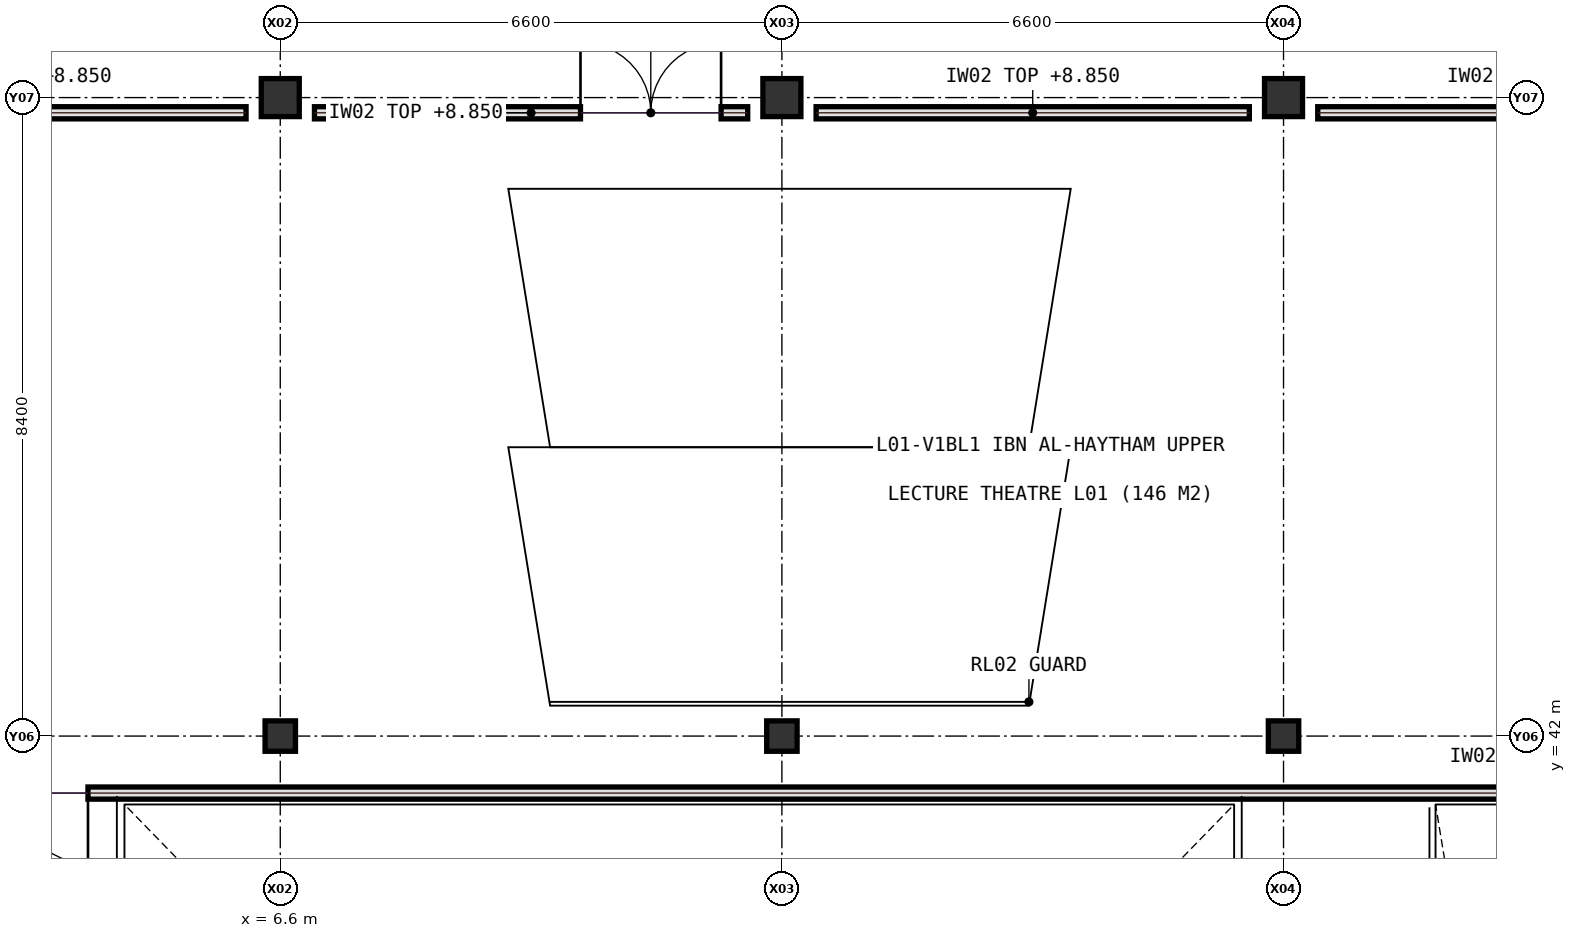
"""IFC4 building model, lengths in metres.
Left out: names, types, materials, properties, quantities, classifications, styles, units other than length and angle.
Written with IfcOpenShell. Run it as: python <this file> out.ifc"""

import sys

from ifc_helpers import new_model, si_unit, direction, frame, frame_2d, origin, origin_2d, place, context, subcontext, project, spatial, rectangle, extrude, element, fill, save


model = new_model("IFC4")
c1 = context("Model", 3, precision=1e-05, world=origin(), true_north=direction((0.0, 1.0)))
c2 = subcontext(c1, "Body", "Model", "MODEL_VIEW")
j1 = project(units=[si_unit("LENGTHUNIT", "METRE"), si_unit("PLANEANGLEUNIT", "RADIAN")], contexts=[c1])
p1 = place(None, origin())
s1 = spatial("IfcSite", under=j1, at=p1, CompositionType="ELEMENT")
p2 = place(p1, origin())
s2 = spatial("IfcBuilding", under=s1, at=p2, CompositionType="ELEMENT")
p3 = place(p2, frame((0.0, 0.0, 5.4)))
s3 = spatial("IfcBuildingStorey", under=s2, at=p3, CompositionType="ELEMENT", Elevation=5.4)
p4 = place(p3, frame((6.6, 42.0, 0.0), z_axis=(0.0, 0.0, 1.0), x_axis=(1.0, 0.0, 0.0)))
e1 = element("IfcColumn", 1, at=p4, inside=s3, PredefinedType="COLUMN", context=c2, shape_type="SweptSolid", body=[
    extrude(rectangle(XDim=0.4, YDim=0.4, at=origin_2d()), origin(), (0.0, 0.0, 1.0), 4.5),
])
p5 = place(p3, frame((6.6, 50.4, 0.0), z_axis=(0.0, 0.0, 1.0), x_axis=(1.0, 0.0, 0.0)))
e2 = element("IfcColumn", 2, at=p5, inside=s3, PredefinedType="COLUMN", context=c2, shape_type="SweptSolid", body=[
    extrude(rectangle(XDim=0.5, YDim=0.5, at=origin_2d()), origin(), (0.0, 0.0, 1.0), 4.5),
])
p6 = place(p3, frame((13.2, 42.0, 0.0), z_axis=(0.0, 0.0, 1.0), x_axis=(1.0, 0.0, 0.0)))
e3 = element("IfcColumn", 3, at=p6, inside=s3, PredefinedType="COLUMN", context=c2, shape_type="SweptSolid", body=[
    extrude(rectangle(XDim=0.4, YDim=0.4, at=origin_2d()), origin(), (0.0, 0.0, 1.0), 4.5),
])
p7 = place(p3, frame((13.2, 50.4, 0.0), z_axis=(0.0, 0.0, 1.0), x_axis=(1.0, 0.0, 0.0)))
e4 = element("IfcColumn", 4, at=p7, inside=s3, PredefinedType="COLUMN", context=c2, shape_type="SweptSolid", body=[
    extrude(rectangle(XDim=0.5, YDim=0.5, at=origin_2d()), origin(), (0.0, 0.0, 1.0), 4.5),
])
p8 = place(p3, frame((19.8, 42.0, 0.0), z_axis=(0.0, 0.0, 1.0), x_axis=(1.0, 0.0, 0.0)))
e5 = element("IfcColumn", 5, at=p8, inside=s3, PredefinedType="COLUMN", context=c2, shape_type="SweptSolid", body=[
    extrude(rectangle(XDim=0.4, YDim=0.4, at=origin_2d()), origin(), (0.0, 0.0, 1.0), 4.5),
])
p9 = place(p3, frame((19.8, 50.4, 0.0), z_axis=(0.0, 0.0, 1.0), x_axis=(1.0, 0.0, 0.0)))
e6 = element("IfcColumn", 6, at=p9, inside=s3, PredefinedType="COLUMN", context=c2, shape_type="SweptSolid", body=[
    extrude(rectangle(XDim=0.5, YDim=0.5, at=origin_2d()), origin(), (0.0, 0.0, 1.0), 4.5),
])
p10 = place(p3, frame((0.32, 41.25, 0.0), z_axis=(0.0, 0.0, 1.0), x_axis=(1.0, 0.0, 0.0)))
e7 = element("IfcWall", 7, at=p10, inside=s3, PredefinedType="PARTITIONING", context=c2, shape_type="SweptSolid", body=[
    extrude(rectangle(XDim=45.63, YDim=0.16, at=frame_2d((22.815, 0.0))), origin(), (0.0, 0.0, 1.0), 3.45),
])
p11 = place(p10, frame((1.9, 0.0, 0.0)))
e8 = element("IfcOpeningElement", 8, at=p11, cuts=e7, PredefinedType="OPENING", context=c2, shape_type="SweptSolid", body=[
    extrude(rectangle(XDim=1.85, YDim=2.25, at=frame_2d((0.925, 1.125))), frame((0.0, 0.09, 0.0), z_axis=(0.0, -1.0, 0.0), x_axis=(1.0, 0.0, 0.0)), (0.0, 0.0, 1.0), 0.18),
])
p12 = place(p10, frame((24.6, 0.0, 0.0)))
e9 = element("IfcOpeningElement", 9, at=p12, cuts=e7, PredefinedType="OPENING", context=c2, shape_type="SweptSolid", body=[
    extrude(rectangle(XDim=1.85, YDim=2.25, at=frame_2d((0.925, 1.125))), frame((0.0, 0.09, 0.0), z_axis=(0.0, -1.0, 0.0), x_axis=(1.0, 0.0, 0.0)), (0.0, 0.0, 1.0), 0.18),
])
p13 = place(p10, frame((43.2, 0.0, 0.0)))
e10 = element("IfcOpeningElement", 10, at=p13, cuts=e7, PredefinedType="OPENING", context=c2, shape_type="SweptSolid", body=[
    extrude(rectangle(XDim=1.85, YDim=2.25, at=frame_2d((0.925, 1.125))), frame((0.0, 0.09, 0.0), z_axis=(0.0, -1.0, 0.0), x_axis=(1.0, 0.0, 0.0)), (0.0, 0.0, 1.0), 0.18),
])
p14 = place(p3, frame((0.32, 50.2, 0.0), z_axis=(0.0, 0.0, 1.0), x_axis=(1.0, 0.0, 0.0)))
e11 = element("IfcWall", 11, at=p14, inside=s3, PredefinedType="PARTITIONING", context=c2, shape_type="SweptSolid", body=[
    extrude(rectangle(XDim=5.83, YDim=0.16, at=frame_2d((2.915, 0.0))), origin(), (0.0, 0.0, 1.0), 3.45),
])
p15 = place(p3, frame((7.05, 50.2, 0.0), z_axis=(0.0, 0.0, 1.0), x_axis=(1.0, 0.0, 0.0)))
e12 = element("IfcWall", 12, at=p15, inside=s3, PredefinedType="PARTITIONING", context=c2, shape_type="SweptSolid", body=[
    extrude(rectangle(XDim=5.7, YDim=0.16, at=frame_2d((2.85, 0.0))), origin(), (0.0, 0.0, 1.0), 3.45),
])
p16 = place(p15, frame((3.5, 0.0, 0.0)))
e13 = element("IfcOpeningElement", 13, at=p16, cuts=e12, PredefinedType="OPENING", context=c2, shape_type="SweptSolid", body=[
    extrude(rectangle(XDim=1.85, YDim=2.25, at=frame_2d((0.925, 1.125))), frame((0.0, 0.09, 0.0), z_axis=(0.0, -1.0, 0.0), x_axis=(1.0, 0.0, 0.0)), (0.0, 0.0, 1.0), 0.18),
])
p17 = place(p3, frame((13.65, 50.2, 0.0), z_axis=(0.0, 0.0, 1.0), x_axis=(1.0, 0.0, 0.0)))
e14 = element("IfcWall", 14, at=p17, inside=s3, PredefinedType="PARTITIONING", context=c2, shape_type="SweptSolid", body=[
    extrude(rectangle(XDim=5.7, YDim=0.16, at=frame_2d((2.85, 0.0))), origin(), (0.0, 0.0, 1.0), 3.45),
])
p18 = place(p3, frame((20.25, 50.2, 0.0), z_axis=(0.0, 0.0, 1.0), x_axis=(1.0, 0.0, 0.0)))
e15 = element("IfcWall", 15, at=p18, inside=s3, PredefinedType="PARTITIONING", context=c2, shape_type="SweptSolid", body=[
    extrude(rectangle(XDim=5.7, YDim=0.16, at=frame_2d((2.85, 0.0))), origin(), (0.0, 0.0, 1.0), 3.45),
])
p19 = place(p11, frame((1.85, 0.0, 0.0), z_axis=(0.0, 0.0, 1.0), x_axis=(-1.0, 0.0, 0.0)))
e16 = element("IfcDoor", 16, at=p19, inside=s3, OperationType="DOUBLE_DOOR_SINGLE_SWING", PredefinedType="DOOR", context=c2, shape_type="SweptSolid", body=[
    extrude(rectangle(XDim=1.85, YDim=2.25, at=frame_2d((0.925, 1.125))), frame((0.0, 0.025, 0.0), z_axis=(0.0, -1.0, 0.0), x_axis=(1.0, 0.0, 0.0)), (0.0, 0.0, 1.0), 0.05),
])
fill(e8, e16)
p20 = place(p16, origin())
e17 = element("IfcDoor", 17, at=p20, inside=s3, OperationType="DOUBLE_DOOR_SINGLE_SWING", PredefinedType="DOOR", context=c2, shape_type="SweptSolid", body=[
    extrude(rectangle(XDim=1.85, YDim=2.25, at=frame_2d((0.925, 1.125))), frame((0.0, 0.025, 0.0), z_axis=(0.0, -1.0, 0.0), x_axis=(1.0, 0.0, 0.0)), (0.0, 0.0, 1.0), 0.05),
])
fill(e13, e17)
save(model, sys.argv[1])
